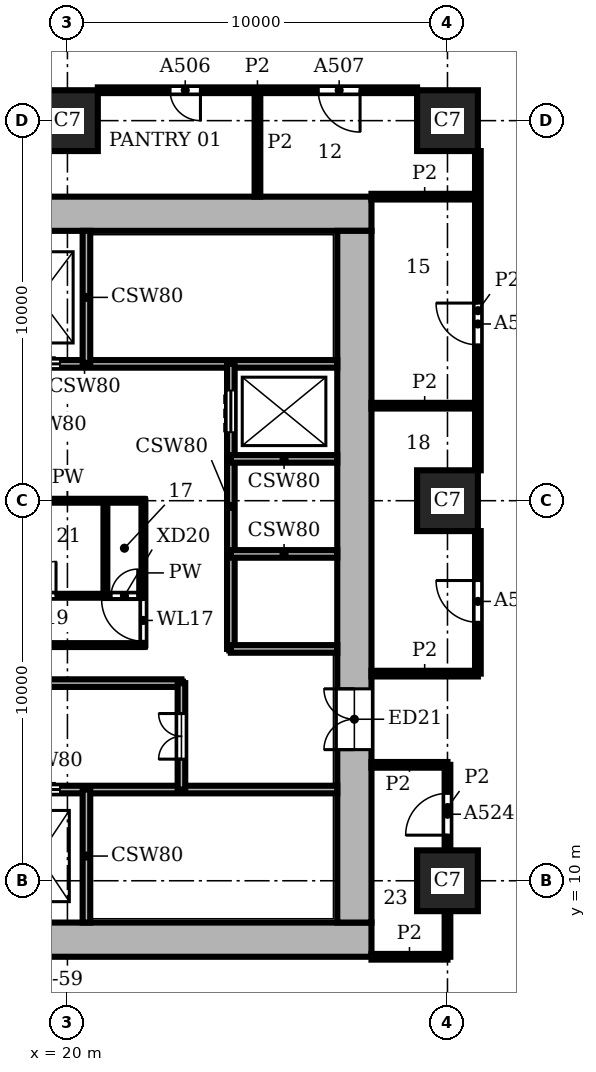
"""IFC4 building model, lengths in metres.
Left out: names, types, materials, properties, quantities, classifications, styles, units other than length and angle.
Written with IfcOpenShell. Run it as: python <this file> out.ifc"""

import sys

from ifc_helpers import new_model, si_unit, direction, frame, frame_2d, origin, origin_2d, place, context, subcontext, project, spatial, rectangle, extrude, element, fill, save


model = new_model("IFC4")
c1 = context("Model", 3, precision=1e-05, world=origin(), true_north=direction((0.0, 1.0)))
c2 = subcontext(c1, "Body", "Model", "MODEL_VIEW")
j1 = project(units=[si_unit("LENGTHUNIT", "METRE"), si_unit("PLANEANGLEUNIT", "RADIAN")], contexts=[c1])
p1 = place(None, origin())
s1 = spatial("IfcSite", under=j1, at=p1, CompositionType="ELEMENT")
p2 = place(p1, origin())
s2 = spatial("IfcBuilding", under=s1, at=p2, CompositionType="ELEMENT")
p3 = place(p2, frame((0.0, 0.0, 58.8)))
s3 = spatial("IfcBuildingStorey", under=s2, at=p3, CompositionType="ELEMENT", Elevation=58.8)
for number, where, z_axis, x_axis in (
    (1, (20.0, 30.0, 0.0), (0.0, 0.0, 1.0), (1.0, 0.0, 0.0)),
    (2, (30.0, 10.0, 0.0), (0.0, 0.0, 1.0), (1.0, 0.0, 0.0)),
    (3, (30.0, 20.0, 0.0), (0.0, 0.0, 1.0), (1.0, 0.0, 0.0)),
    (4, (30.0, 30.0, 0.0), (0.0, 0.0, 1.0), (1.0, 0.0, 0.0)),
):
    element("IfcColumn", number, at=place(p3, frame(where, z_axis=z_axis, x_axis=x_axis)), inside=s3, PredefinedType="COLUMN", context=c2, shape_type="SweptSolid", body=[
        extrude(rectangle(XDim=1.6, YDim=1.6, at=origin_2d()), origin(), (0.0, 0.0, 1.0), 3.9),
    ])
p4 = place(p3, frame((8.0, 8.45, 0.0), z_axis=(0.0, 0.0, 1.0), x_axis=(1.0, 0.0, 0.0)))
e5 = element("IfcWall", 5, at=p4, inside=s3, PredefinedType="SHEAR", context=c2, shape_type="SweptSolid", body=[
    extrude(rectangle(XDim=20.0, YDim=0.9, at=frame_2d((10.0, 0.0))), origin(), (0.0, 0.0, 1.0), 3.9),
])
p5 = place(p3, frame((27.55, 8.9, 0.0), z_axis=(0.0, 0.0, 1.0), x_axis=(0.0, 1.0, 0.0)))
e6 = element("IfcWall", 6, at=p5, inside=s3, PredefinedType="SHEAR", context=c2, shape_type="SweptSolid", body=[
    extrude(rectangle(XDim=18.2, YDim=0.9, at=frame_2d((9.1, 0.0))), origin(), (0.0, 0.0, 1.0), 3.9),
])
p6 = place(p5, frame((4.55, 0.0, 0.0)))
e7 = element("IfcOpeningElement", 7, at=p6, cuts=e6, PredefinedType="OPENING", context=c2, shape_type="SweptSolid", body=[
    extrude(rectangle(XDim=1.6, YDim=2.1, at=frame_2d((0.8, 1.05))), frame((0.0, 0.46, 0.0), z_axis=(0.0, -1.0, 0.0), x_axis=(1.0, 0.0, 0.0)), (0.0, 0.0, 1.0), 0.92),
])
p7 = place(p3, frame((28.0, 27.55, 0.0), z_axis=(0.0, 0.0, 1.0), x_axis=(-1.0, 0.0, 0.0)))
e8 = element("IfcWall", 8, at=p7, inside=s3, PredefinedType="SHEAR", context=c2, shape_type="SweptSolid", body=[
    extrude(rectangle(XDim=20.0, YDim=0.9, at=frame_2d((10.0, 0.0))), origin(), (0.0, 0.0, 1.0), 3.9),
])
p8 = place(p3, frame((13.8, 12.4, 0.0), z_axis=(0.0, 0.0, 1.0), x_axis=(1.0, 0.0, 0.0)))
e9 = element("IfcWall", 9, at=p8, inside=s3, PredefinedType="SHEAR", context=c2, shape_type="SweptSolid", body=[
    extrude(rectangle(XDim=13.3, YDim=0.2, at=frame_2d((6.65, 0.0))), origin(), (0.0, 0.0, 1.0), 3.58),
])
p9 = place(p8, frame((2.4, 0.0, 0.0)))
e10 = element("IfcOpeningElement", 10, at=p9, cuts=e9, PredefinedType="OPENING", context=c2, shape_type="SweptSolid", body=[
    extrude(rectangle(XDim=1.1, YDim=2.1, at=frame_2d((0.55, 1.05))), frame((0.0, 0.11, 0.0), z_axis=(0.0, -1.0, 0.0), x_axis=(1.0, 0.0, 0.0)), (0.0, 0.0, 1.0), 0.22),
])
p10 = place(p8, frame((4.9, 0.0, 0.0)))
e11 = element("IfcOpeningElement", 11, at=p10, cuts=e9, PredefinedType="OPENING", context=c2, shape_type="SweptSolid", body=[
    extrude(rectangle(XDim=1.1, YDim=2.1, at=frame_2d((0.55, 1.05))), frame((0.0, 0.11, 0.0), z_axis=(0.0, -1.0, 0.0), x_axis=(1.0, 0.0, 0.0)), (0.0, 0.0, 1.0), 0.22),
])
p11 = place(p8, frame((0.25, 0.0, 0.0)))
e12 = element("IfcOpeningElement", 12, at=p11, cuts=e9, PredefinedType="OPENING", context=c2, shape_type="SweptSolid", body=[
    extrude(rectangle(XDim=1.0, YDim=2.1, at=frame_2d((0.5, 1.05))), frame((0.0, 0.11, 0.0), z_axis=(0.0, -1.0, 0.0), x_axis=(1.0, 0.0, 0.0)), (0.0, 0.0, 1.0), 0.22),
])
p12 = place(p3, frame((13.3, 15.2, 0.0), z_axis=(0.0, 0.0, 1.0), x_axis=(1.0, 0.0, 0.0)))
e13 = element("IfcWall", 13, at=p12, inside=s3, PredefinedType="SHEAR", context=c2, shape_type="SweptSolid", body=[
    extrude(rectangle(XDim=9.7, YDim=0.2, at=frame_2d((4.85, 0.0))), origin(), (0.0, 0.0, 1.0), 3.58),
])
p13 = place(p3, frame((24.3, 16.1, 0.0), z_axis=(0.0, 0.0, 1.0), x_axis=(1.0, 0.0, 0.0)))
e14 = element("IfcWall", 14, at=p13, inside=s3, PredefinedType="SHEAR", context=c2, shape_type="SweptSolid", body=[
    extrude(rectangle(XDim=2.8, YDim=0.2, at=frame_2d((1.4, 0.0))), origin(), (0.0, 0.0, 1.0), 3.58),
])
p14 = place(p3, frame((14.0, 16.2, 0.0), z_axis=(0.0, 0.0, 1.0), x_axis=(1.0, 0.0, 0.0)))
e15 = element("IfcWall", 15, at=p14, inside=s3, PredefinedType="PARTITIONING", context=c2, shape_type="SweptSolid", body=[
    extrude(rectangle(XDim=8.0, YDim=0.1, at=frame_2d((4.0, 0.0))), origin(), (0.0, 0.0, 1.0), 3.58),
])
p15 = place(p3, frame((14.0, 17.5, 0.0), z_axis=(0.0, 0.0, 1.0), x_axis=(1.0, 0.0, 0.0)))
e16 = element("IfcWall", 16, at=p15, inside=s3, PredefinedType="PARTITIONING", context=c2, shape_type="SweptSolid", body=[
    extrude(rectangle(XDim=8.0, YDim=0.1, at=frame_2d((4.0, 0.0))), origin(), (0.0, 0.0, 1.0), 3.58),
])
p16 = place(p15, frame((1.3, 0.0, 0.0)))
e17 = element("IfcOpeningElement", 17, at=p16, cuts=e16, PredefinedType="OPENING", context=c2, shape_type="SweptSolid", body=[
    extrude(rectangle(XDim=0.9, YDim=2.1, at=frame_2d((0.45, 1.05))), frame((0.0, 0.06, 0.0), z_axis=(0.0, -1.0, 0.0), x_axis=(1.0, 0.0, 0.0)), (0.0, 0.0, 1.0), 0.12),
])
p17 = place(p15, frame((4.8, 0.0, 0.0)))
e18 = element("IfcOpeningElement", 18, at=p17, cuts=e16, PredefinedType="OPENING", context=c2, shape_type="SweptSolid", body=[
    extrude(rectangle(XDim=0.9, YDim=2.1, at=frame_2d((0.45, 1.05))), frame((0.0, 0.06, 0.0), z_axis=(0.0, -1.0, 0.0), x_axis=(1.0, 0.0, 0.0)), (0.0, 0.0, 1.0), 0.12),
])
p18 = place(p15, frame((7.15, 0.0, 0.0)))
e19 = element("IfcOpeningElement", 19, at=p18, cuts=e16, PredefinedType="OPENING", context=c2, shape_type="SweptSolid", body=[
    extrude(rectangle(XDim=0.7, YDim=2.1, at=frame_2d((0.35, 1.05))), frame((0.0, 0.06, 0.0), z_axis=(0.0, -1.0, 0.0), x_axis=(1.0, 0.0, 0.0)), (0.0, 0.0, 1.0), 0.12),
])
p19 = place(p3, frame((24.3, 18.6, 0.0), z_axis=(0.0, 0.0, 1.0), x_axis=(1.0, 0.0, 0.0)))
e20 = element("IfcWall", 20, at=p19, inside=s3, PredefinedType="SHEAR", context=c2, shape_type="SweptSolid", body=[
    extrude(rectangle(XDim=2.8, YDim=0.2, at=frame_2d((1.4, 0.0))), origin(), (0.0, 0.0, 1.0), 3.58),
])
p20 = place(p3, frame((18.0, 20.0, 0.0), z_axis=(0.0, 0.0, 1.0), x_axis=(1.0, 0.0, 0.0)))
e21 = element("IfcWall", 21, at=p20, inside=s3, PredefinedType="PARTITIONING", context=c2, shape_type="SweptSolid", body=[
    extrude(rectangle(XDim=4.0, YDim=0.1, at=frame_2d((2.0, 0.0))), origin(), (0.0, 0.0, 1.0), 3.58),
])
p21 = place(p3, frame((24.3, 21.1, 0.0), z_axis=(0.0, 0.0, 1.0), x_axis=(1.0, 0.0, 0.0)))
e22 = element("IfcWall", 22, at=p21, inside=s3, PredefinedType="SHEAR", context=c2, shape_type="SweptSolid", body=[
    extrude(rectangle(XDim=2.8, YDim=0.2, at=frame_2d((1.4, 0.0))), origin(), (0.0, 0.0, 1.0), 3.58),
])
p22 = place(p3, frame((13.8, 23.6, 0.0), z_axis=(0.0, 0.0, 1.0), x_axis=(1.0, 0.0, 0.0)))
e23 = element("IfcWall", 23, at=p22, inside=s3, PredefinedType="SHEAR", context=c2, shape_type="SweptSolid", body=[
    extrude(rectangle(XDim=13.3, YDim=0.2, at=frame_2d((6.65, 0.0))), origin(), (0.0, 0.0, 1.0), 3.58),
])
p23 = place(p22, frame((2.4, 0.0, 0.0)))
e24 = element("IfcOpeningElement", 24, at=p23, cuts=e23, PredefinedType="OPENING", context=c2, shape_type="SweptSolid", body=[
    extrude(rectangle(XDim=1.1, YDim=2.1, at=frame_2d((0.55, 1.05))), frame((0.0, 0.11, 0.0), z_axis=(0.0, -1.0, 0.0), x_axis=(1.0, 0.0, 0.0)), (0.0, 0.0, 1.0), 0.22),
])
p24 = place(p22, frame((4.9, 0.0, 0.0)))
e25 = element("IfcOpeningElement", 25, at=p24, cuts=e23, PredefinedType="OPENING", context=c2, shape_type="SweptSolid", body=[
    extrude(rectangle(XDim=1.1, YDim=2.1, at=frame_2d((0.55, 1.05))), frame((0.0, 0.11, 0.0), z_axis=(0.0, -1.0, 0.0), x_axis=(1.0, 0.0, 0.0)), (0.0, 0.0, 1.0), 0.22),
])
p25 = place(p22, frame((0.25, 0.0, 0.0)))
e26 = element("IfcOpeningElement", 26, at=p25, cuts=e23, PredefinedType="OPENING", context=c2, shape_type="SweptSolid", body=[
    extrude(rectangle(XDim=1.0, YDim=2.1, at=frame_2d((0.5, 1.05))), frame((0.0, 0.11, 0.0), z_axis=(0.0, -1.0, 0.0), x_axis=(1.0, 0.0, 0.0)), (0.0, 0.0, 1.0), 0.22),
])
for number, where, z_axis, x_axis in (
    (27, (20.5, 8.9, 0.0), (0.0, 0.0, 1.0), (0.0, 1.0, 0.0)),
    (28, (20.5, 23.6, 0.0), (0.0, 0.0, 1.0), (0.0, 1.0, 0.0)),
):
    element("IfcWall", number, at=place(p3, frame(where, z_axis=z_axis, x_axis=x_axis)), inside=s3, PredefinedType="SHEAR", context=c2, shape_type="SweptSolid", body=[
        extrude(rectangle(XDim=3.5, YDim=0.2, at=frame_2d((1.75, 0.0))), origin(), (0.0, 0.0, 1.0), 3.58),
    ])
p26 = place(p3, frame((21.0, 17.5, 0.0), z_axis=(0.0, 0.0, 1.0), x_axis=(0.0, 1.0, 0.0)))
e29 = element("IfcWall", 29, at=p26, inside=s3, PredefinedType="PARTITIONING", context=c2, shape_type="SweptSolid", body=[
    extrude(rectangle(XDim=2.5, YDim=0.1, at=frame_2d((1.25, 0.0))), origin(), (0.0, 0.0, 1.0), 3.58),
])
p27 = place(p3, frame((22.0, 16.2, 0.0), z_axis=(0.0, 0.0, 1.0), x_axis=(0.0, 1.0, 0.0)))
e30 = element("IfcWall", 30, at=p27, inside=s3, PredefinedType="PARTITIONING", context=c2, shape_type="SweptSolid", body=[
    extrude(rectangle(XDim=3.8, YDim=0.1, at=frame_2d((1.9, 0.0))), origin(), (0.0, 0.0, 1.0), 3.58),
])
p28 = place(p27, frame((0.1, 0.0, 0.0)))
e31 = element("IfcOpeningElement", 31, at=p28, cuts=e30, PredefinedType="OPENING", context=c2, shape_type="SweptSolid", body=[
    extrude(rectangle(XDim=1.1, YDim=2.1, at=frame_2d((0.55, 1.05))), frame((0.0, 0.06, 0.0), z_axis=(0.0, -1.0, 0.0), x_axis=(1.0, 0.0, 0.0)), (0.0, 0.0, 1.0), 0.12),
])
p29 = place(p3, frame((23.0, 12.4, 0.0), z_axis=(0.0, 0.0, 1.0), x_axis=(0.0, 1.0, 0.0)))
e32 = element("IfcWall", 32, at=p29, inside=s3, PredefinedType="SHEAR", context=c2, shape_type="SweptSolid", body=[
    extrude(rectangle(XDim=2.8, YDim=0.2, at=frame_2d((1.4, 0.0))), origin(), (0.0, 0.0, 1.0), 3.58),
])
p30 = place(p29, frame((0.8, 0.0, 0.0)))
e33 = element("IfcOpeningElement", 33, at=p30, cuts=e32, PredefinedType="OPENING", context=c2, shape_type="SweptSolid", body=[
    extrude(rectangle(XDim=1.2, YDim=2.1, at=frame_2d((0.6, 1.05))), frame((0.0, 0.11, 0.0), z_axis=(0.0, -1.0, 0.0), x_axis=(1.0, 0.0, 0.0)), (0.0, 0.0, 1.0), 0.22),
])
p31 = place(p3, frame((24.3, 16.1, 0.0), z_axis=(0.0, 0.0, 1.0), x_axis=(0.0, 1.0, 0.0)))
e34 = element("IfcWall", 34, at=p31, inside=s3, PredefinedType="SHEAR", context=c2, shape_type="SweptSolid", body=[
    extrude(rectangle(XDim=7.5, YDim=0.2, at=frame_2d((3.75, 0.0))), origin(), (0.0, 0.0, 1.0), 3.58),
])
p32 = place(p31, frame((5.7, 0.0, 0.0)))
e35 = element("IfcOpeningElement", 35, at=p32, cuts=e34, PredefinedType="OPENING", context=c2, shape_type="SweptSolid", body=[
    extrude(rectangle(XDim=1.1, YDim=2.1, at=frame_2d((0.55, 1.05))), frame((0.0, 0.11, 0.0), z_axis=(0.0, -1.0, 0.0), x_axis=(1.0, 0.0, 0.0)), (0.0, 0.0, 1.0), 0.22),
])
p33 = place(p3, frame((25.0, 28.0, 0.0), z_axis=(0.0, 0.0, 1.0), x_axis=(0.0, 1.0, 0.0)))
e36 = element("IfcWall", 36, at=p33, inside=s3, PredefinedType="PARTITIONING", context=c2, shape_type="SweptSolid", body=[
    extrude(rectangle(XDim=2.8, YDim=0.15, at=frame_2d((1.4, 0.0))), origin(), (0.0, 0.0, 1.0), 3.58),
])
p34 = place(p3, frame((30.0, 8.0, 0.0), z_axis=(0.0, 0.0, 1.0), x_axis=(0.0, 1.0, 0.0)))
e37 = element("IfcWall", 37, at=p34, inside=s3, PredefinedType="PARTITIONING", context=c2, shape_type="SweptSolid", body=[
    extrude(rectangle(XDim=1.2, YDim=0.15, at=frame_2d((0.6, 0.0))), origin(), (0.0, 0.0, 1.0), 3.58),
])
p35 = place(p3, frame((30.0, 10.8, 0.0), z_axis=(0.0, 0.0, 1.0), x_axis=(0.0, 1.0, 0.0)))
e38 = element("IfcWall", 38, at=p35, inside=s3, PredefinedType="PARTITIONING", context=c2, shape_type="SweptSolid", body=[
    extrude(rectangle(XDim=2.25, YDim=0.15, at=frame_2d((1.125, 0.0))), origin(), (0.0, 0.0, 1.0), 3.58),
])
p36 = place(p35, frame((0.4, 0.0, 0.0)))
e39 = element("IfcOpeningElement", 39, at=p36, cuts=e38, PredefinedType="OPENING", context=c2, shape_type="SweptSolid", body=[
    extrude(rectangle(XDim=1.1, YDim=2.1, at=frame_2d((0.55, 1.05))), frame((0.0, 0.085, 0.0), z_axis=(0.0, -1.0, 0.0), x_axis=(1.0, 0.0, 0.0)), (0.0, 0.0, 1.0), 0.17),
])
p37 = place(p3, frame((30.8, 15.45, 0.0), z_axis=(0.0, 0.0, 1.0), x_axis=(0.0, 1.0, 0.0)))
e40 = element("IfcWall", 40, at=p37, inside=s3, PredefinedType="PARTITIONING", context=c2, shape_type="SweptSolid", body=[
    extrude(rectangle(XDim=3.75, YDim=0.15, at=frame_2d((1.875, 0.0))), origin(), (0.0, 0.0, 1.0), 3.58),
])
p38 = place(p37, frame((1.35, 0.0, 0.0)))
e41 = element("IfcOpeningElement", 41, at=p38, cuts=e40, PredefinedType="OPENING", context=c2, shape_type="SweptSolid", body=[
    extrude(rectangle(XDim=1.1, YDim=2.1, at=frame_2d((0.55, 1.05))), frame((0.0, 0.085, 0.0), z_axis=(0.0, -1.0, 0.0), x_axis=(1.0, 0.0, 0.0)), (0.0, 0.0, 1.0), 0.17),
])
p39 = place(p3, frame((30.8, 20.8, 0.0), z_axis=(0.0, 0.0, 1.0), x_axis=(0.0, 1.0, 0.0)))
e42 = element("IfcWall", 42, at=p39, inside=s3, PredefinedType="PARTITIONING", context=c2, shape_type="SweptSolid", body=[
    extrude(rectangle(XDim=8.4, YDim=0.15, at=frame_2d((4.2, 0.0))), origin(), (0.0, 0.0, 1.0), 3.58),
])
p40 = place(p39, frame((3.3, 0.0, 0.0)))
e43 = element("IfcOpeningElement", 43, at=p40, cuts=e42, PredefinedType="OPENING", context=c2, shape_type="SweptSolid", body=[
    extrude(rectangle(XDim=1.1, YDim=2.1, at=frame_2d((0.55, 1.05))), frame((0.0, 0.085, 0.0), z_axis=(0.0, -1.0, 0.0), x_axis=(1.0, 0.0, 0.0)), (0.0, 0.0, 1.0), 0.17),
])
for number, where, z_axis, x_axis in (
    (44, (28.0, 8.0, 0.0), (0.0, 0.0, 1.0), (1.0, 0.0, 0.0)),
    (45, (28.0, 13.05, 0.0), (0.0, 0.0, 1.0), (1.0, 0.0, 0.0)),
):
    element("IfcWall", number, at=place(p3, frame(where, z_axis=z_axis, x_axis=x_axis)), inside=s3, PredefinedType="PARTITIONING", context=c2, shape_type="SweptSolid", body=[
        extrude(rectangle(XDim=2.0, YDim=0.15, at=frame_2d((1.0, 0.0))), origin(), (0.0, 0.0, 1.0), 3.58),
    ])
for number, where, z_axis, x_axis in (
    (46, (28.0, 15.45, 0.0), (0.0, 0.0, 1.0), (1.0, 0.0, 0.0)),
    (47, (28.0, 22.5, 0.0), (0.0, 0.0, 1.0), (1.0, 0.0, 0.0)),
    (48, (28.0, 28.0, 0.0), (0.0, 0.0, 1.0), (1.0, 0.0, 0.0)),
):
    element("IfcWall", number, at=place(p3, frame(where, z_axis=z_axis, x_axis=x_axis)), inside=s3, PredefinedType="PARTITIONING", context=c2, shape_type="SweptSolid", body=[
        extrude(rectangle(XDim=2.8, YDim=0.15, at=frame_2d((1.4, 0.0))), origin(), (0.0, 0.0, 1.0), 3.58),
    ])
p41 = place(p3, frame((20.8, 30.8, 0.0), z_axis=(0.0, 0.0, 1.0), x_axis=(1.0, 0.0, 0.0)))
e49 = element("IfcWall", 49, at=p41, inside=s3, PredefinedType="PARTITIONING", context=c2, shape_type="SweptSolid", body=[
    extrude(rectangle(XDim=8.4, YDim=0.15, at=frame_2d((4.2, 0.0))), origin(), (0.0, 0.0, 1.0), 3.58),
])
p42 = place(p41, frame((1.9, 0.0, 0.0)))
e50 = element("IfcOpeningElement", 50, at=p42, cuts=e49, PredefinedType="OPENING", context=c2, shape_type="SweptSolid", body=[
    extrude(rectangle(XDim=0.8, YDim=2.1, at=frame_2d((0.4, 1.05))), frame((0.0, 0.085, 0.0), z_axis=(0.0, -1.0, 0.0), x_axis=(1.0, 0.0, 0.0)), (0.0, 0.0, 1.0), 0.17),
])
p43 = place(p41, frame((5.8, 0.0, 0.0)))
e51 = element("IfcOpeningElement", 51, at=p43, cuts=e49, PredefinedType="OPENING", context=c2, shape_type="SweptSolid", body=[
    extrude(rectangle(XDim=1.1, YDim=2.1, at=frame_2d((0.55, 1.05))), frame((0.0, 0.085, 0.0), z_axis=(0.0, -1.0, 0.0), x_axis=(1.0, 0.0, 0.0)), (0.0, 0.0, 1.0), 0.17),
])
p44 = place(p32, origin())
e52 = element("IfcDoor", 52, at=p44, inside=s3, OperationType="DOUBLE_DOOR_SLIDING", PredefinedType="DOOR", context=c2, shape_type="SweptSolid", body=[
    extrude(rectangle(XDim=1.1, YDim=2.1, at=frame_2d((0.55, 1.05))), frame((0.0, 0.025, 0.0), z_axis=(0.0, -1.0, 0.0), x_axis=(1.0, 0.0, 0.0)), (0.0, 0.0, 1.0), 0.05),
])
fill(e35, e52)
p45 = place(p10, origin())
e53 = element("IfcDoor", 53, at=p45, inside=s3, OperationType="DOUBLE_DOOR_SLIDING", PredefinedType="DOOR", context=c2, shape_type="SweptSolid", body=[
    extrude(rectangle(XDim=1.1, YDim=2.1, at=frame_2d((0.55, 1.05))), frame((0.0, 0.025, 0.0), z_axis=(0.0, -1.0, 0.0), x_axis=(1.0, 0.0, 0.0)), (0.0, 0.0, 1.0), 0.05),
])
fill(e11, e53)
p46 = place(p24, origin())
e54 = element("IfcDoor", 54, at=p46, inside=s3, OperationType="DOUBLE_DOOR_SLIDING", PredefinedType="DOOR", context=c2, shape_type="SweptSolid", body=[
    extrude(rectangle(XDim=1.1, YDim=2.1, at=frame_2d((0.55, 1.05))), frame((0.0, 0.025, 0.0), z_axis=(0.0, -1.0, 0.0), x_axis=(1.0, 0.0, 0.0)), (0.0, 0.0, 1.0), 0.05),
])
fill(e25, e54)
p47 = place(p30, origin())
e55 = element("IfcDoor", 55, at=p47, inside=s3, OperationType="DOUBLE_DOOR_SINGLE_SWING", PredefinedType="DOOR", context=c2, shape_type="SweptSolid", body=[
    extrude(rectangle(XDim=1.2, YDim=2.1, at=frame_2d((0.6, 1.05))), frame((0.0, 0.025, 0.0), z_axis=(0.0, -1.0, 0.0), x_axis=(1.0, 0.0, 0.0)), (0.0, 0.0, 1.0), 0.05),
])
fill(e33, e55)
p48 = place(p28, origin())
e56 = element("IfcDoor", 56, at=p48, inside=s3, OperationType="SINGLE_SWING_RIGHT", PredefinedType="DOOR", context=c2, shape_type="SweptSolid", body=[
    extrude(rectangle(XDim=1.1, YDim=2.1, at=frame_2d((0.55, 1.05))), frame((0.0, 0.025, 0.0), z_axis=(0.0, -1.0, 0.0), x_axis=(1.0, 0.0, 0.0)), (0.0, 0.0, 1.0), 0.05),
])
fill(e31, e56)
p49 = place(p17, origin())
e57 = element("IfcDoor", 57, at=p49, inside=s3, OperationType="SINGLE_SWING_RIGHT", PredefinedType="DOOR", context=c2, shape_type="SweptSolid", body=[
    extrude(rectangle(XDim=0.9, YDim=2.1, at=frame_2d((0.45, 1.05))), frame((0.0, 0.025, 0.0), z_axis=(0.0, -1.0, 0.0), x_axis=(1.0, 0.0, 0.0)), (0.0, 0.0, 1.0), 0.05),
])
fill(e18, e57)
p50 = place(p18, origin())
e58 = element("IfcDoor", 58, at=p50, inside=s3, OperationType="SINGLE_SWING_RIGHT", PredefinedType="DOOR", context=c2, shape_type="SweptSolid", body=[
    extrude(rectangle(XDim=0.7, YDim=2.1, at=frame_2d((0.35, 1.05))), frame((0.0, 0.025, 0.0), z_axis=(0.0, -1.0, 0.0), x_axis=(1.0, 0.0, 0.0)), (0.0, 0.0, 1.0), 0.05),
])
fill(e19, e58)
p51 = place(p6, origin())
e59 = element("IfcDoor", 59, at=p51, inside=s3, OperationType="DOUBLE_DOOR_SINGLE_SWING", PredefinedType="DOOR", context=c2, shape_type="SweptSolid", body=[
    extrude(rectangle(XDim=1.6, YDim=2.1, at=frame_2d((0.8, 1.05))), frame((0.0, 0.025, 0.0), z_axis=(0.0, -1.0, 0.0), x_axis=(1.0, 0.0, 0.0)), (0.0, 0.0, 1.0), 0.05),
])
fill(e7, e59)
p52 = place(p38, origin())
e60 = element("IfcDoor", 60, at=p52, inside=s3, OperationType="SINGLE_SWING_RIGHT", PredefinedType="DOOR", context=c2, shape_type="SweptSolid", body=[
    extrude(rectangle(XDim=1.1, YDim=2.1, at=frame_2d((0.55, 1.05))), frame((0.0, 0.025, 0.0), z_axis=(0.0, -1.0, 0.0), x_axis=(1.0, 0.0, 0.0)), (0.0, 0.0, 1.0), 0.05),
])
fill(e41, e60)
p53 = place(p40, origin())
e61 = element("IfcDoor", 61, at=p53, inside=s3, OperationType="SINGLE_SWING_RIGHT", PredefinedType="DOOR", context=c2, shape_type="SweptSolid", body=[
    extrude(rectangle(XDim=1.1, YDim=2.1, at=frame_2d((0.55, 1.05))), frame((0.0, 0.025, 0.0), z_axis=(0.0, -1.0, 0.0), x_axis=(1.0, 0.0, 0.0)), (0.0, 0.0, 1.0), 0.05),
])
fill(e43, e61)
p54 = place(p42, frame((0.8, 0.0, 0.0), z_axis=(0.0, 0.0, 1.0), x_axis=(-1.0, 0.0, 0.0)))
e62 = element("IfcDoor", 62, at=p54, inside=s3, OperationType="SINGLE_SWING_LEFT", PredefinedType="DOOR", context=c2, shape_type="SweptSolid", body=[
    extrude(rectangle(XDim=0.8, YDim=2.1, at=frame_2d((0.4, 1.05))), frame((0.0, 0.025, 0.0), z_axis=(0.0, -1.0, 0.0), x_axis=(1.0, 0.0, 0.0)), (0.0, 0.0, 1.0), 0.05),
])
fill(e50, e62)
p55 = place(p43, frame((1.1, 0.0, 0.0), z_axis=(0.0, 0.0, 1.0), x_axis=(-1.0, 0.0, 0.0)))
e63 = element("IfcDoor", 63, at=p55, inside=s3, OperationType="SINGLE_SWING_LEFT", PredefinedType="DOOR", context=c2, shape_type="SweptSolid", body=[
    extrude(rectangle(XDim=1.1, YDim=2.1, at=frame_2d((0.55, 1.05))), frame((0.0, 0.025, 0.0), z_axis=(0.0, -1.0, 0.0), x_axis=(1.0, 0.0, 0.0)), (0.0, 0.0, 1.0), 0.05),
])
fill(e51, e63)
p56 = place(p36, origin())
e64 = element("IfcDoor", 64, at=p56, inside=s3, OperationType="SINGLE_SWING_LEFT", PredefinedType="DOOR", context=c2, shape_type="SweptSolid", body=[
    extrude(rectangle(XDim=1.1, YDim=2.1, at=frame_2d((0.55, 1.05))), frame((0.0, 0.025, 0.0), z_axis=(0.0, -1.0, 0.0), x_axis=(1.0, 0.0, 0.0)), (0.0, 0.0, 1.0), 0.05),
])
fill(e39, e64)
save(model, sys.argv[1])
